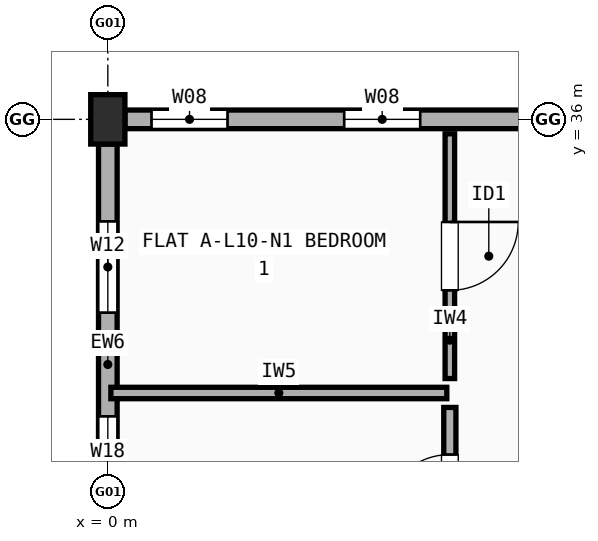
"""IFC4 building model, lengths in metres.
Left out: names, types, materials, properties, quantities, classifications, styles, units other than length and angle.
Written with IfcOpenShell. Run it as: python <this file> out.ifc"""

import sys

from ifc_helpers import new_model, si_unit, direction, frame, frame_2d, origin, origin_2d, place, context, subcontext, project, spatial, rectangle, extrude, element, fill, save


model = new_model("IFC4")
c1 = context("Model", 3, precision=1e-05, world=origin(), true_north=direction((0.0, 1.0)))
c2 = subcontext(c1, "Body", "Model", "MODEL_VIEW")
j1 = project(units=[si_unit("LENGTHUNIT", "METRE"), si_unit("PLANEANGLEUNIT", "RADIAN")], contexts=[c1])
p1 = place(None, origin())
s1 = spatial("IfcSite", under=j1, at=p1, CompositionType="ELEMENT")
p2 = place(p1, origin())
s2 = spatial("IfcBuilding", under=s1, at=p2, CompositionType="ELEMENT")
p3 = place(p2, frame((0.0, 0.0, 33.3)))
s3 = spatial("IfcBuildingStorey", under=s2, at=p3, CompositionType="ELEMENT", Elevation=33.3)
p4 = place(p3, frame((0.0, 36.0, 0.0), z_axis=(0.0, 0.0, 1.0), x_axis=(1.0, 0.0, 0.0)))
e1 = element("IfcColumn", 1, at=p4, inside=s3, PredefinedType="COLUMN", context=c2, shape_type="SweptSolid", body=[
    extrude(rectangle(XDim=0.45, YDim=0.65, at=origin_2d()), origin(), (0.0, 0.0, 1.0), 2.99),
])
p5 = place(p3, frame((5.75, 36.0, 0.0), z_axis=(0.0, 0.0, 1.0), x_axis=(-1.0, 0.0, 0.0)))
e2 = element("IfcWall", 2, at=p5, inside=s3, PredefinedType="STANDARD", context=c2, shape_type="SweptSolid", body=[
    extrude(rectangle(XDim=5.525, YDim=0.245, at=frame_2d((2.762, 0.0))), origin(), (0.0, 0.0, 1.0), 2.472),
])
p6 = place(p5, frame((1.64, 0.0, 0.9)))
e3 = element("IfcOpeningElement", 3, at=p6, cuts=e2, PredefinedType="OPENING", context=c2, shape_type="SweptSolid", body=[
    extrude(rectangle(XDim=1.0, YDim=1.4, at=frame_2d((0.5, 0.7))), frame((0.0, 0.133, 0.0), z_axis=(0.0, -1.0, 0.0), x_axis=(1.0, 0.0, 0.0)), (0.0, 0.0, 1.0), 0.265),
])
p7 = place(p5, frame((4.175, 0.0, 0.9)))
e4 = element("IfcOpeningElement", 4, at=p7, cuts=e2, PredefinedType="OPENING", context=c2, shape_type="SweptSolid", body=[
    extrude(rectangle(XDim=1.0, YDim=1.4, at=frame_2d((0.5, 0.7))), frame((0.0, 0.133, 0.0), z_axis=(0.0, -1.0, 0.0), x_axis=(1.0, 0.0, 0.0)), (0.0, 0.0, 1.0), 0.265),
])
p8 = place(p3, frame((0.0, 35.675, 0.0), z_axis=(0.0, 0.0, 1.0), x_axis=(0.0, -1.0, 0.0)))
e5 = element("IfcWall", 5, at=p8, inside=s3, PredefinedType="STANDARD", context=c2, shape_type="SweptSolid", body=[
    extrude(rectangle(XDim=5.35, YDim=0.245, at=frame_2d((2.675, 0.0))), origin(), (0.0, 0.0, 1.0), 2.472),
])
p9 = place(p8, frame((1.018, 0.0, 0.9)))
e6 = element("IfcOpeningElement", 6, at=p9, cuts=e5, PredefinedType="OPENING", context=c2, shape_type="SweptSolid", body=[
    extrude(rectangle(XDim=1.2, YDim=1.35, at=frame_2d((0.6, 0.675))), frame((0.0, 0.133, 0.0), z_axis=(0.0, -1.0, 0.0), x_axis=(1.0, 0.0, 0.0)), (0.0, 0.0, 1.0), 0.265),
])
p10 = place(p8, frame((3.583, 0.0, 0.9)))
e7 = element("IfcOpeningElement", 7, at=p10, cuts=e5, PredefinedType="OPENING", context=c2, shape_type="SweptSolid", body=[
    extrude(rectangle(XDim=1.5, YDim=1.4, at=frame_2d((0.75, 0.7))), frame((0.0, 0.133, 0.0), z_axis=(0.0, -1.0, 0.0), x_axis=(1.0, 0.0, 0.0)), (0.0, 0.0, 1.0), 0.265),
])
p11 = place(p3, frame((4.5, 32.59, 0.0), z_axis=(0.0, 0.0, 1.0), x_axis=(0.0, 1.0, 0.0)))
e8 = element("IfcWall", 8, at=p11, inside=s3, PredefinedType="PARTITIONING", context=c2, shape_type="SweptSolid", body=[
    extrude(rectangle(XDim=3.22, YDim=0.125, at=frame_2d((1.61, 0.0))), origin(), (0.0, 0.0, 1.0), 2.99),
])
p12 = place(p11, frame((1.16, 0.0, 0.0)))
e9 = element("IfcOpeningElement", 9, at=p12, cuts=e8, PredefinedType="OPENING", context=c2, shape_type="SweptSolid", body=[
    extrude(rectangle(XDim=0.9, YDim=2.1, at=frame_2d((0.45, 1.05))), frame((0.0, 0.073, 0.0), z_axis=(0.0, -1.0, 0.0), x_axis=(1.0, 0.0, 0.0)), (0.0, 0.0, 1.0), 0.145),
])
p13 = place(p3, frame((4.5, 30.09, 0.0), z_axis=(0.0, 0.0, 1.0), x_axis=(0.0, 1.0, 0.0)))
e10 = element("IfcWall", 10, at=p13, inside=s3, PredefinedType="PLUMBINGWALL", context=c2, shape_type="SweptSolid", body=[
    extrude(rectangle(XDim=2.12, YDim=0.16, at=frame_2d((1.06, 0.0))), origin(), (0.0, 0.0, 1.0), 2.472),
])
p14 = place(p13, frame((0.62, 0.0, 0.0)))
e11 = element("IfcOpeningElement", 11, at=p14, cuts=e10, PredefinedType="OPENING", context=c2, shape_type="SweptSolid", body=[
    extrude(rectangle(XDim=0.88, YDim=2.1, at=frame_2d((0.44, 1.05))), frame((0.0, 0.09, 0.0), z_axis=(0.0, -1.0, 0.0), x_axis=(1.0, 0.0, 0.0)), (0.0, 0.0, 1.0), 0.18),
])
p15 = place(p3, frame((0.04, 32.4, 0.0), z_axis=(0.0, 0.0, 1.0), x_axis=(1.0, 0.0, 0.0)))
e12 = element("IfcWall", 12, at=p15, inside=s3, PredefinedType="PARTITIONING", context=c2, shape_type="SweptSolid", body=[
    extrude(rectangle(XDim=4.42, YDim=0.15, at=frame_2d((2.21, 0.0))), origin(), (0.0, 0.0, 1.0), 2.472),
])
p16 = place(p6, origin())
e13 = element("IfcWindow", 13, at=p16, inside=s3, PartitioningType="SINGLE_PANEL", PredefinedType="WINDOW", context=c2, shape_type="SweptSolid", body=[
    extrude(rectangle(XDim=1.0, YDim=1.4, at=frame_2d((0.5, 0.7))), frame((0.0, 0.03, 0.0), z_axis=(0.0, -1.0, 0.0), x_axis=(1.0, 0.0, 0.0)), (0.0, 0.0, 1.0), 0.06),
])
fill(e3, e13)
p17 = place(p7, origin())
e14 = element("IfcWindow", 14, at=p17, inside=s3, PartitioningType="SINGLE_PANEL", PredefinedType="WINDOW", context=c2, shape_type="SweptSolid", body=[
    extrude(rectangle(XDim=1.0, YDim=1.4, at=frame_2d((0.5, 0.7))), frame((0.0, 0.03, 0.0), z_axis=(0.0, -1.0, 0.0), x_axis=(1.0, 0.0, 0.0)), (0.0, 0.0, 1.0), 0.06),
])
fill(e4, e14)
p18 = place(p9, origin())
e15 = element("IfcWindow", 15, at=p18, inside=s3, PartitioningType="SINGLE_PANEL", PredefinedType="WINDOW", context=c2, shape_type="SweptSolid", body=[
    extrude(rectangle(XDim=1.2, YDim=1.35, at=frame_2d((0.6, 0.675))), frame((0.0, 0.03, 0.0), z_axis=(0.0, -1.0, 0.0), x_axis=(1.0, 0.0, 0.0)), (0.0, 0.0, 1.0), 0.06),
])
fill(e6, e15)
p19 = place(p10, origin())
e16 = element("IfcWindow", 16, at=p19, inside=s3, PartitioningType="SINGLE_PANEL", PredefinedType="WINDOW", context=c2, shape_type="SweptSolid", body=[
    extrude(rectangle(XDim=1.5, YDim=1.4, at=frame_2d((0.75, 0.7))), frame((0.0, 0.03, 0.0), z_axis=(0.0, -1.0, 0.0), x_axis=(1.0, 0.0, 0.0)), (0.0, 0.0, 1.0), 0.06),
])
fill(e7, e16)
p20 = place(p12, origin())
e17 = element("IfcDoor", 17, at=p20, inside=s3, OperationType="SINGLE_SWING_RIGHT", PredefinedType="DOOR", context=c2, shape_type="SweptSolid", body=[
    extrude(rectangle(XDim=0.9, YDim=2.1, at=frame_2d((0.45, 1.05))), frame((0.0, 0.025, 0.0), z_axis=(0.0, -1.0, 0.0), x_axis=(1.0, 0.0, 0.0)), (0.0, 0.0, 1.0), 0.05),
])
fill(e9, e17)
p21 = place(p14, origin())
e18 = element("IfcDoor", 18, at=p21, inside=s3, OperationType="SINGLE_SWING_LEFT", PredefinedType="DOOR", context=c2, shape_type="SweptSolid", body=[
    extrude(rectangle(XDim=0.88, YDim=2.1, at=frame_2d((0.44, 1.05))), frame((0.0, 0.025, 0.0), z_axis=(0.0, -1.0, 0.0), x_axis=(1.0, 0.0, 0.0)), (0.0, 0.0, 1.0), 0.05),
])
fill(e11, e18)
save(model, sys.argv[1])
